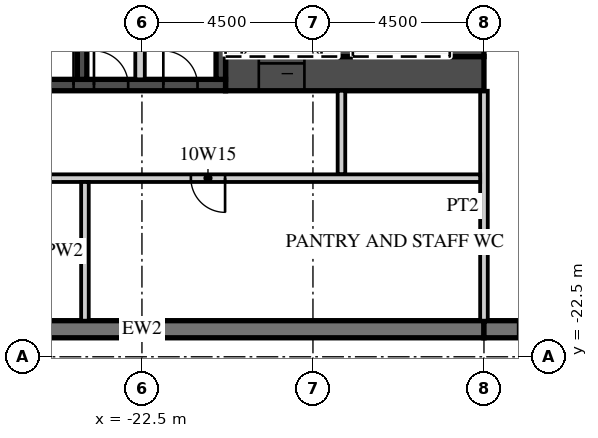
"""IFC4 building model, lengths in metres.
Left out: names, types, materials, properties, quantities, classifications, styles, units other than length and angle.
Written with IfcOpenShell. Run it as: python <this file> out.ifc"""

import sys

from ifc_helpers import new_model, si_unit, direction, frame, frame_2d, origin, place, context, subcontext, project, spatial, rectangle, extrude, element, fill, save


model = new_model("IFC4")
c1 = context("Model", 3, precision=1e-05, world=origin(), true_north=direction((0.0, 1.0)))
c2 = subcontext(c1, "Body", "Model", "MODEL_VIEW")
j1 = project(units=[si_unit("LENGTHUNIT", "METRE"), si_unit("PLANEANGLEUNIT", "RADIAN")], contexts=[c1])
p1 = place(None, origin())
s1 = spatial("IfcSite", under=j1, at=p1, CompositionType="ELEMENT")
p2 = place(p1, origin())
s2 = spatial("IfcBuilding", under=s1, at=p2, CompositionType="ELEMENT")
p3 = place(p2, frame((0.0, 0.0, 63.3)))
s3 = spatial("IfcBuildingStorey", under=s2, at=p3, CompositionType="ELEMENT", Elevation=63.3)
p4 = place(p3, frame((-31.5, -21.775, 0.0), z_axis=(0.0, 0.0, 1.0), x_axis=(1.0, 0.0, 0.0)))
e1 = element("IfcWall", 1, at=p4, inside=s3, PredefinedType="SOLIDWALL", context=c2, shape_type="SweptSolid", body=[
    extrude(rectangle(XDim=18.0, YDim=0.45, at=frame_2d((9.0, 0.0))), origin(), (0.0, 0.0, 1.0), 3.02),
])
p5 = place(p3, frame((-13.5, -21.775, 0.0), z_axis=(0.0, 0.0, 1.0), x_axis=(1.0, 0.0, 0.0)))
e2 = element("IfcWall", 2, at=p5, inside=s3, PredefinedType="SOLIDWALL", context=c2, shape_type="SweptSolid", body=[
    extrude(rectangle(XDim=54.5, YDim=0.45, at=frame_2d((27.25, 0.0))), origin(), (0.0, 0.0, 1.0), 3.02),
])
p6 = place(p5, frame((0.9, 0.0, 0.45)))
e3 = element("IfcOpeningElement", 3, at=p6, cuts=e2, PredefinedType="OPENING", context=c2, shape_type="SweptSolid", body=[
    extrude(rectangle(XDim=2.7, YDim=2.25, at=frame_2d((1.35, 1.125))), frame((0.0, 0.235, 0.0), z_axis=(0.0, -1.0, 0.0), x_axis=(1.0, 0.0, 0.0)), (0.0, 0.0, 1.0), 0.47),
])
p7 = place(p5, frame((5.4, 0.0, 0.45)))
e4 = element("IfcOpeningElement", 4, at=p7, cuts=e2, PredefinedType="OPENING", context=c2, shape_type="SweptSolid", body=[
    extrude(rectangle(XDim=2.7, YDim=2.25, at=frame_2d((1.35, 1.125))), frame((0.0, 0.235, 0.0), z_axis=(0.0, -1.0, 0.0), x_axis=(1.0, 0.0, 0.0)), (0.0, 0.0, 1.0), 0.47),
])
p8 = place(p5, frame((9.9, 0.0, 0.45)))
e5 = element("IfcOpeningElement", 5, at=p8, cuts=e2, PredefinedType="OPENING", context=c2, shape_type="SweptSolid", body=[
    extrude(rectangle(XDim=2.7, YDim=2.25, at=frame_2d((1.35, 1.125))), frame((0.0, 0.235, 0.0), z_axis=(0.0, -1.0, 0.0), x_axis=(1.0, 0.0, 0.0)), (0.0, 0.0, 1.0), 0.47),
])
p9 = place(p5, frame((14.4, 0.0, 0.45)))
e6 = element("IfcOpeningElement", 6, at=p9, cuts=e2, PredefinedType="OPENING", context=c2, shape_type="SweptSolid", body=[
    extrude(rectangle(XDim=2.7, YDim=2.25, at=frame_2d((1.35, 1.125))), frame((0.0, 0.235, 0.0), z_axis=(0.0, -1.0, 0.0), x_axis=(1.0, 0.0, 0.0)), (0.0, 0.0, 1.0), 0.47),
])
p10 = place(p5, frame((18.9, 0.0, 0.45)))
e7 = element("IfcOpeningElement", 7, at=p10, cuts=e2, PredefinedType="OPENING", context=c2, shape_type="SweptSolid", body=[
    extrude(rectangle(XDim=2.7, YDim=2.25, at=frame_2d((1.35, 1.125))), frame((0.0, 0.235, 0.0), z_axis=(0.0, -1.0, 0.0), x_axis=(1.0, 0.0, 0.0)), (0.0, 0.0, 1.0), 0.47),
])
p11 = place(p5, frame((23.4, 0.0, 0.45)))
e8 = element("IfcOpeningElement", 8, at=p11, cuts=e2, PredefinedType="OPENING", context=c2, shape_type="SweptSolid", body=[
    extrude(rectangle(XDim=2.7, YDim=2.25, at=frame_2d((1.35, 1.125))), frame((0.0, 0.235, 0.0), z_axis=(0.0, -1.0, 0.0), x_axis=(1.0, 0.0, 0.0)), (0.0, 0.0, 1.0), 0.47),
])
p12 = place(p5, frame((27.9, 0.0, 0.45)))
e9 = element("IfcOpeningElement", 9, at=p12, cuts=e2, PredefinedType="OPENING", context=c2, shape_type="SweptSolid", body=[
    extrude(rectangle(XDim=2.7, YDim=2.25, at=frame_2d((1.35, 1.125))), frame((0.0, 0.235, 0.0), z_axis=(0.0, -1.0, 0.0), x_axis=(1.0, 0.0, 0.0)), (0.0, 0.0, 1.0), 0.47),
])
p13 = place(p5, frame((32.4, 0.0, 0.45)))
e10 = element("IfcOpeningElement", 10, at=p13, cuts=e2, PredefinedType="OPENING", context=c2, shape_type="SweptSolid", body=[
    extrude(rectangle(XDim=2.7, YDim=2.25, at=frame_2d((1.35, 1.125))), frame((0.0, 0.235, 0.0), z_axis=(0.0, -1.0, 0.0), x_axis=(1.0, 0.0, 0.0)), (0.0, 0.0, 1.0), 0.47),
])
p14 = place(p5, frame((36.9, 0.0, 0.45)))
e11 = element("IfcOpeningElement", 11, at=p14, cuts=e2, PredefinedType="OPENING", context=c2, shape_type="SweptSolid", body=[
    extrude(rectangle(XDim=2.7, YDim=2.25, at=frame_2d((1.35, 1.125))), frame((0.0, 0.235, 0.0), z_axis=(0.0, -1.0, 0.0), x_axis=(1.0, 0.0, 0.0)), (0.0, 0.0, 1.0), 0.47),
])
p15 = place(p5, frame((41.4, 0.0, 0.45)))
e12 = element("IfcOpeningElement", 12, at=p15, cuts=e2, PredefinedType="OPENING", context=c2, shape_type="SweptSolid", body=[
    extrude(rectangle(XDim=2.7, YDim=2.25, at=frame_2d((1.35, 1.125))), frame((0.0, 0.235, 0.0), z_axis=(0.0, -1.0, 0.0), x_axis=(1.0, 0.0, 0.0)), (0.0, 0.0, 1.0), 0.47),
])
p16 = place(p5, frame((45.9, 0.0, 0.45)))
e13 = element("IfcOpeningElement", 13, at=p16, cuts=e2, PredefinedType="OPENING", context=c2, shape_type="SweptSolid", body=[
    extrude(rectangle(XDim=2.7, YDim=2.25, at=frame_2d((1.35, 1.125))), frame((0.0, 0.235, 0.0), z_axis=(0.0, -1.0, 0.0), x_axis=(1.0, 0.0, 0.0)), (0.0, 0.0, 1.0), 0.47),
])
p17 = place(p5, frame((50.4, 0.0, 0.45)))
e14 = element("IfcOpeningElement", 14, at=p17, cuts=e2, PredefinedType="OPENING", context=c2, shape_type="SweptSolid", body=[
    extrude(rectangle(XDim=2.7, YDim=2.25, at=frame_2d((1.35, 1.125))), frame((0.0, 0.235, 0.0), z_axis=(0.0, -1.0, 0.0), x_axis=(1.0, 0.0, 0.0)), (0.0, 0.0, 1.0), 0.47),
])
p18 = place(p3, frame((-13.5, -21.55, 0.0), z_axis=(0.0, 0.0, 1.0), x_axis=(0.0, 1.0, 0.0)))
e15 = element("IfcWall", 15, at=p18, inside=s3, PredefinedType="PARTITIONING", context=c2, shape_type="SweptSolid", body=[
    extrude(rectangle(XDim=6.05, YDim=0.2, at=frame_2d((3.025, 0.0))), origin(), (0.0, 0.0, 1.0), 3.02),
])
p19 = place(p3, frame((-20.3, -15.05, 0.0), z_axis=(0.0, 0.0, 1.0), x_axis=(1.0, 0.0, 0.0)))
e16 = element("IfcWall", 16, at=p19, inside=s3, PredefinedType="SHEAR", context=c2, shape_type="SweptSolid", body=[
    extrude(rectangle(XDim=6.8, YDim=0.9, at=frame_2d((3.4, 0.0))), origin(), (0.0, 0.0, 1.0), 3.02),
])
p20 = place(p19, frame((0.875, 0.0, 0.0)))
e17 = element("IfcOpeningElement", 17, at=p20, cuts=e16, PredefinedType="OPENING", context=c2, shape_type="SweptSolid", body=[
    extrude(rectangle(XDim=1.2, YDim=2.1, at=frame_2d((0.6, 1.05))), frame((0.0, 0.46, 0.0), z_axis=(0.0, -1.0, 0.0), x_axis=(1.0, 0.0, 0.0)), (0.0, 0.0, 1.0), 0.92),
])
p21 = place(p3, frame((-30.6, -15.35, 0.0), z_axis=(0.0, 0.0, 1.0), x_axis=(1.0, 0.0, 0.0)))
e18 = element("IfcWall", 18, at=p21, inside=s3, PredefinedType="SHEAR", context=c2, shape_type="SweptSolid", body=[
    extrude(rectangle(XDim=10.3, YDim=0.3, at=frame_2d((5.15, 0.0))), origin(), (0.0, 0.0, 1.0), 3.02),
])
p22 = place(p21, frame((5.0, 0.0, 0.0)))
e19 = element("IfcOpeningElement", 19, at=p22, cuts=e18, PredefinedType="OPENING", context=c2, shape_type="SweptSolid", body=[
    extrude(rectangle(XDim=1.3, YDim=2.1, at=frame_2d((0.65, 1.05))), frame((0.0, 0.16, 0.0), z_axis=(0.0, -1.0, 0.0), x_axis=(1.0, 0.0, 0.0)), (0.0, 0.0, 1.0), 0.32),
])
p23 = place(p21, frame((6.837, 0.0, 0.0)))
e20 = element("IfcOpeningElement", 20, at=p23, cuts=e18, PredefinedType="OPENING", context=c2, shape_type="SweptSolid", body=[
    extrude(rectangle(XDim=0.9, YDim=2.1, at=frame_2d((0.45, 1.05))), frame((0.0, 0.16, 0.0), z_axis=(0.0, -1.0, 0.0), x_axis=(1.0, 0.0, 0.0)), (0.0, 0.0, 1.0), 0.32),
])
p24 = place(p21, frame((8.663, 0.0, 0.0)))
e21 = element("IfcOpeningElement", 21, at=p24, cuts=e18, PredefinedType="OPENING", context=c2, shape_type="SweptSolid", body=[
    extrude(rectangle(XDim=0.9, YDim=2.1, at=frame_2d((0.45, 1.05))), frame((0.0, 0.16, 0.0), z_axis=(0.0, -1.0, 0.0), x_axis=(1.0, 0.0, 0.0)), (0.0, 0.0, 1.0), 0.32),
])
p25 = place(p3, frame((-13.95, -14.6, 0.0), z_axis=(0.0, 0.0, 1.0), x_axis=(0.0, 1.0, 0.0)))
e22 = element("IfcWall", 22, at=p25, inside=s3, PredefinedType="SHEAR", context=c2, shape_type="SweptSolid", body=[
    extrude(rectangle(XDim=12.2, YDim=0.9, at=frame_2d((6.1, 0.0))), origin(), (0.0, 0.0, 1.0), 3.02),
])
p26 = place(p3, frame((-17.15, -14.6, 0.0), z_axis=(0.0, 0.0, 1.0), x_axis=(0.0, 1.0, 0.0)))
e23 = element("IfcWall", 23, at=p26, inside=s3, PredefinedType="SHEAR", context=c2, shape_type="SweptSolid", body=[
    extrude(rectangle(XDim=5.8, YDim=0.4, at=frame_2d((2.9, 0.0))), origin(), (0.0, 0.0, 1.0), 3.02),
])
for number, where, z_axis, x_axis in (
    (24, (-20.425, -15.2, 0.0), (0.0, 0.0, 1.0), (0.0, 1.0, 0.0)),
    (25, (-24.075, -15.2, 0.0), (0.0, 0.0, 1.0), (0.0, 1.0, 0.0)),
):
    element("IfcWall", number, at=place(p3, frame(where, z_axis=z_axis, x_axis=x_axis)), inside=s3, PredefinedType="SHEAR", context=c2, shape_type="SweptSolid", body=[
        extrude(rectangle(XDim=3.25, YDim=0.25, at=frame_2d((1.625, 0.0))), origin(), (0.0, 0.0, 1.0), 3.02),
    ])
p27 = place(p3, frame((-22.55, -15.2, 0.0), z_axis=(0.0, 0.0, 1.0), x_axis=(0.0, 1.0, 0.0)))
e26 = element("IfcWall", 26, at=p27, inside=s3, PredefinedType="PARTITIONING", context=c2, shape_type="SweptSolid", body=[
    extrude(rectangle(XDim=3.25, YDim=0.25, at=frame_2d((1.625, 0.0))), origin(), (0.0, 0.0, 1.0), 3.02),
])
p28 = place(p3, frame((-17.25, -17.7, 0.0), z_axis=(0.0, 0.0, 1.0), x_axis=(0.0, 1.0, 0.0)))
e27 = element("IfcWall", 27, at=p28, inside=s3, PredefinedType="PARTITIONING", context=c2, shape_type="SweptSolid", body=[
    extrude(rectangle(XDim=2.2, YDim=0.2, at=frame_2d((1.1, 0.0))), origin(), (0.0, 0.0, 1.0), 3.02),
])
p29 = place(p3, frame((-44.55, -17.8, 0.0), z_axis=(0.0, 0.0, 1.0), x_axis=(1.0, 0.0, 0.0)))
e28 = element("IfcWall", 28, at=p29, inside=s3, PredefinedType="PARTITIONING", context=c2, shape_type="SweptSolid", body=[
    extrude(rectangle(XDim=30.95, YDim=0.2, at=frame_2d((15.475, 0.0))), origin(), (0.0, 0.0, 1.0), 3.02),
])
p30 = place(p29, frame((15.038, 0.0, 0.0)))
e29 = element("IfcOpeningElement", 29, at=p30, cuts=e28, PredefinedType="OPENING", context=c2, shape_type="SweptSolid", body=[
    extrude(rectangle(XDim=0.9, YDim=2.1, at=frame_2d((0.45, 1.05))), frame((0.0, 0.11, 0.0), z_axis=(0.0, -1.0, 0.0), x_axis=(1.0, 0.0, 0.0)), (0.0, 0.0, 1.0), 0.22),
])
p31 = place(p29, frame((23.337, 0.0, 0.0)))
e30 = element("IfcOpeningElement", 30, at=p31, cuts=e28, PredefinedType="OPENING", context=c2, shape_type="SweptSolid", body=[
    extrude(rectangle(XDim=0.9, YDim=2.1, at=frame_2d((0.45, 1.05))), frame((0.0, 0.11, 0.0), z_axis=(0.0, -1.0, 0.0), x_axis=(1.0, 0.0, 0.0)), (0.0, 0.0, 1.0), 0.22),
])
p32 = place(p3, frame((-24.0, -21.55, 0.0), z_axis=(0.0, 0.0, 1.0), x_axis=(0.0, 1.0, 0.0)))
e31 = element("IfcWall", 31, at=p32, inside=s3, PredefinedType="PARTITIONING", context=c2, shape_type="SweptSolid", body=[
    extrude(rectangle(XDim=3.65, YDim=0.2, at=frame_2d((1.825, 0.0))), origin(), (0.0, 0.0, 1.0), 3.02),
])
p33 = place(p20, origin())
e32 = element("IfcDoor", 32, at=p33, inside=s3, OperationType="SLIDING_TO_LEFT", PredefinedType="DOOR", context=c2, shape_type="SweptSolid", body=[
    extrude(rectangle(XDim=1.2, YDim=2.1, at=frame_2d((0.6, 1.05))), frame((0.0, 0.025, 0.0), z_axis=(0.0, -1.0, 0.0), x_axis=(1.0, 0.0, 0.0)), (0.0, 0.0, 1.0), 0.05),
])
fill(e17, e32)
p34 = place(p22, origin())
e33 = element("IfcDoor", 33, at=p34, inside=s3, OperationType="SINGLE_SWING_RIGHT", PredefinedType="DOOR", context=c2, shape_type="SweptSolid", body=[
    extrude(rectangle(XDim=1.3, YDim=2.1, at=frame_2d((0.65, 1.05))), frame((0.0, 0.025, 0.0), z_axis=(0.0, -1.0, 0.0), x_axis=(1.0, 0.0, 0.0)), (0.0, 0.0, 1.0), 0.05),
])
fill(e19, e33)
p35 = place(p23, origin())
e34 = element("IfcDoor", 34, at=p35, inside=s3, OperationType="SINGLE_SWING_LEFT", PredefinedType="DOOR", context=c2, shape_type="SweptSolid", body=[
    extrude(rectangle(XDim=0.9, YDim=2.1, at=frame_2d((0.45, 1.05))), frame((0.0, 0.025, 0.0), z_axis=(0.0, -1.0, 0.0), x_axis=(1.0, 0.0, 0.0)), (0.0, 0.0, 1.0), 0.05),
])
fill(e20, e34)
p36 = place(p24, origin())
e35 = element("IfcDoor", 35, at=p36, inside=s3, OperationType="SINGLE_SWING_LEFT", PredefinedType="DOOR", context=c2, shape_type="SweptSolid", body=[
    extrude(rectangle(XDim=0.9, YDim=2.1, at=frame_2d((0.45, 1.05))), frame((0.0, 0.025, 0.0), z_axis=(0.0, -1.0, 0.0), x_axis=(1.0, 0.0, 0.0)), (0.0, 0.0, 1.0), 0.05),
])
fill(e21, e35)
p37 = place(p31, origin())
e36 = element("IfcDoor", 36, at=p37, inside=s3, OperationType="SINGLE_SWING_RIGHT", PredefinedType="DOOR", context=c2, shape_type="SweptSolid", body=[
    extrude(rectangle(XDim=0.9, YDim=2.1, at=frame_2d((0.45, 1.05))), frame((0.0, 0.025, 0.0), z_axis=(0.0, -1.0, 0.0), x_axis=(1.0, 0.0, 0.0)), (0.0, 0.0, 1.0), 0.05),
])
fill(e30, e36)
save(model, sys.argv[1])
